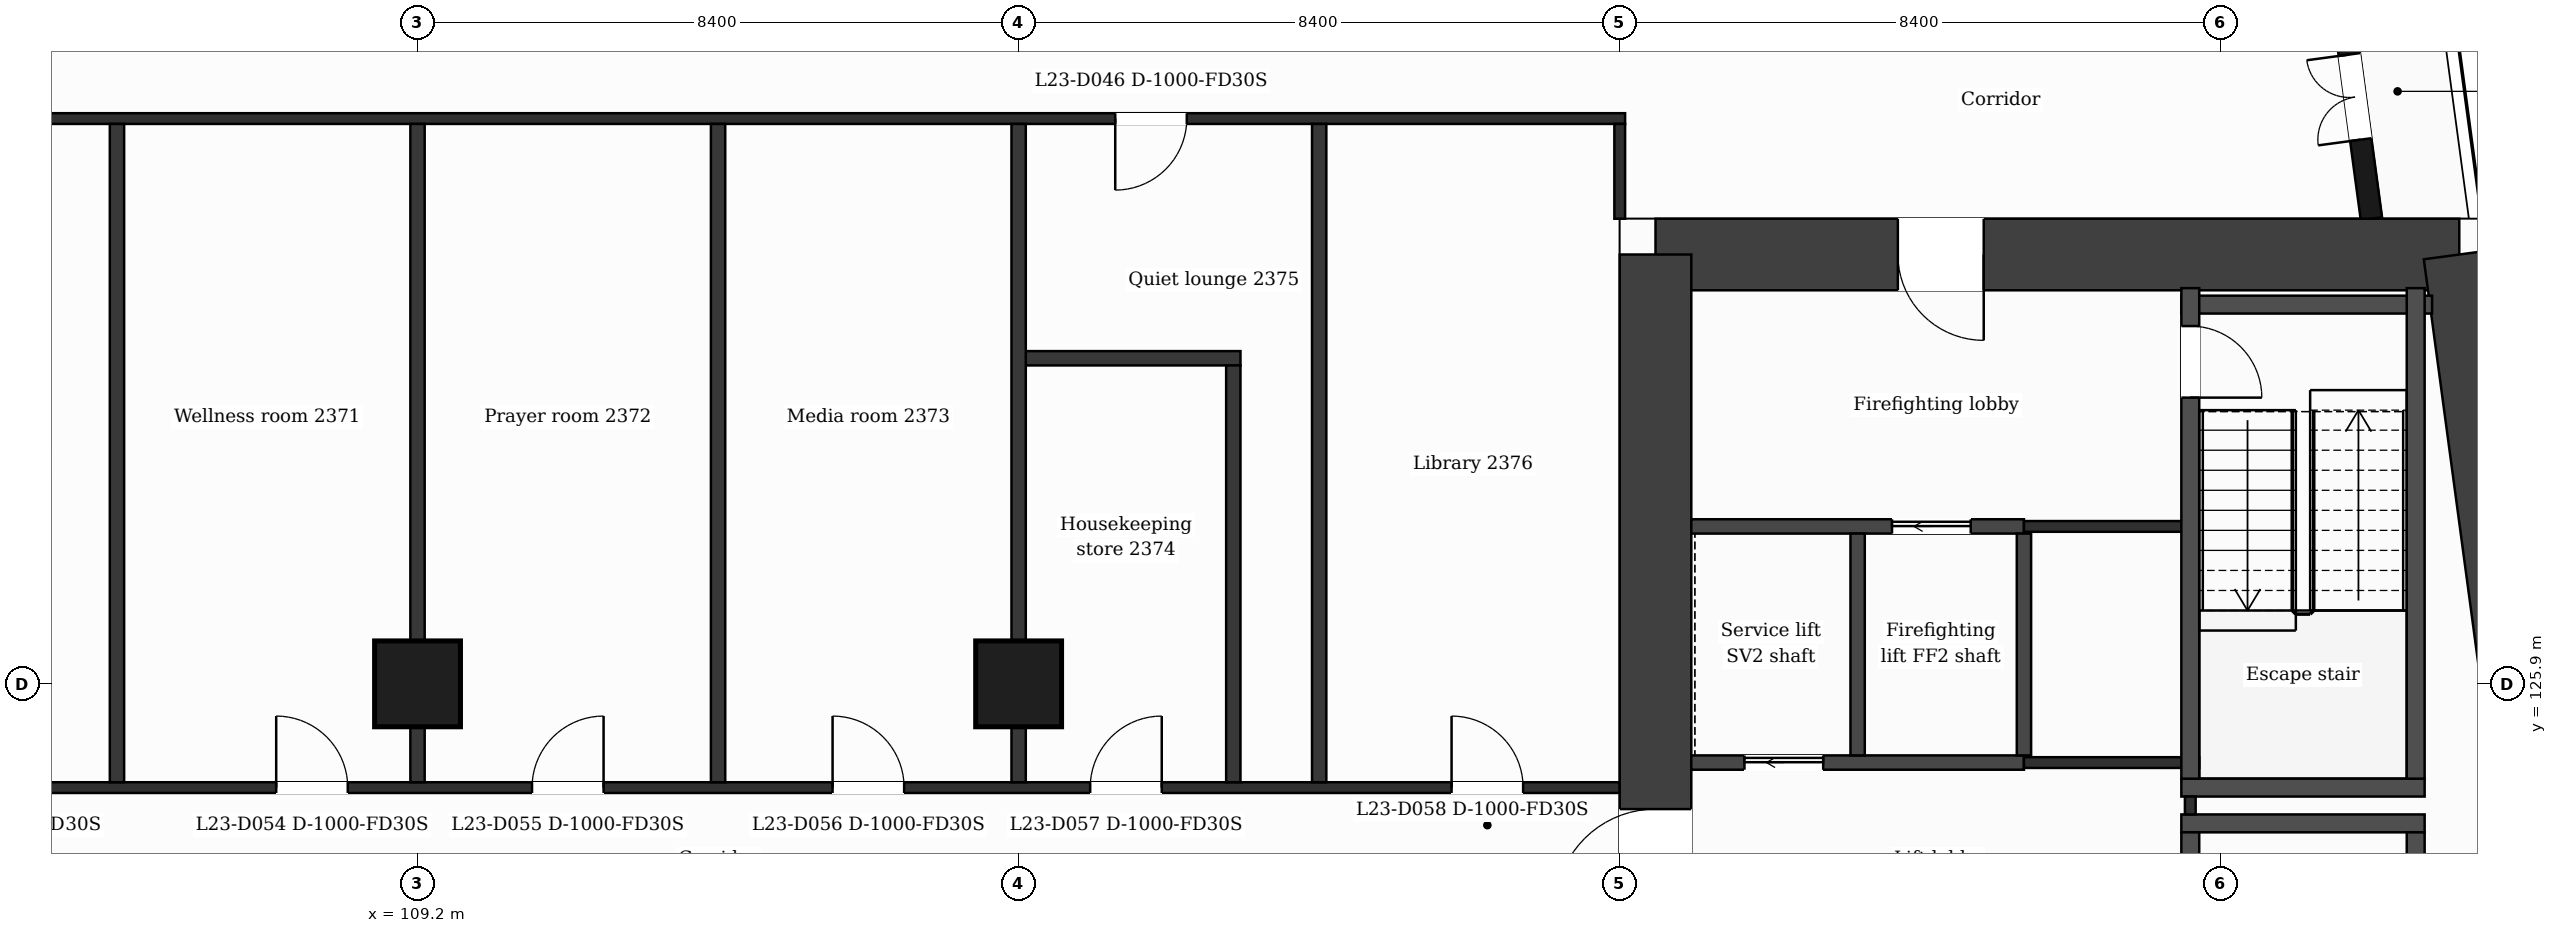
"""IFC4 building model, lengths in metres.
Left out: names, types, materials, properties, quantities, classifications, styles, units other than length and angle.
Written with IfcOpenShell. Run it as: python <this file> out.ifc"""

import sys

from ifc_helpers import new_model, si_unit, direction, frame, frame_2d, origin, origin_2d, place, context, subcontext, project, spatial, rectangle, extrude, element, fill, save


model = new_model("IFC4")
c1 = context("Model", 3, precision=1e-05, world=origin(), true_north=direction((0.0, 1.0)))
c2 = subcontext(c1, "Body", "Model", "MODEL_VIEW")
j1 = project(units=[si_unit("LENGTHUNIT", "METRE"), si_unit("PLANEANGLEUNIT", "RADIAN")], contexts=[c1])
p1 = place(None, origin())
s1 = spatial("IfcSite", under=j1, at=p1, CompositionType="ELEMENT")
p2 = place(p1, origin())
s2 = spatial("IfcBuilding", under=s1, at=p2, CompositionType="ELEMENT")
p3 = place(p2, frame((0.0, 0.0, 102.1)))
s3 = spatial("IfcBuildingStorey", under=s2, at=p3, CompositionType="ELEMENT", Elevation=102.1)
p4 = place(p3, frame((126.5, 131.9, 0.0), z_axis=(0.0, 0.0, 1.0), x_axis=(1.0, 0.0, 0.0)))
e1 = element("IfcWall", 1, at=p4, inside=s3, PredefinedType="SHEAR", context=c2, shape_type="SweptSolid", body=[
    extrude(rectangle(XDim=11.232, YDim=1.0, at=frame_2d((5.616, 0.0))), origin(), (0.0, 0.0, 1.0), 3.7),
])
p5 = place(p4, frame((3.386, 0.0, 0.0)))
e2 = element("IfcOpeningElement", 2, at=p5, cuts=e1, PredefinedType="OPENING", context=c2, shape_type="SweptSolid", body=[
    extrude(rectangle(XDim=1.2, YDim=2.1, at=frame_2d((0.6, 1.05))), frame((0.0, 0.51, 0.0), z_axis=(0.0, -1.0, 0.0), x_axis=(1.0, 0.0, 0.0)), (0.0, 0.0, 1.0), 1.02),
])
p6 = place(p3, frame((137.732, 131.9, 0.0), z_axis=(0.0, 0.0, 1.0), x_axis=(0.133411141623, -0.991060778808, 0.0)))
e3 = element("IfcWall", 3, at=p6, inside=s3, PredefinedType="SHEAR", context=c2, shape_type="SweptSolid", body=[
    extrude(rectangle(XDim=21.189, YDim=1.0, at=frame_2d((10.595, 0.0))), origin(), (0.0, 0.0, 1.0), 3.7),
])
p7 = place(p3, frame((126.5, 110.9, 0.0), z_axis=(0.0, 0.0, 1.0), x_axis=(0.0, 1.0, 0.0)))
e4 = element("IfcWall", 4, at=p7, inside=s3, PredefinedType="SHEAR", context=c2, shape_type="SweptSolid", body=[
    extrude(rectangle(XDim=21.0, YDim=1.0, at=frame_2d((10.5, 0.0))), origin(), (0.0, 0.0, 1.0), 3.7),
])
p8 = place(p7, frame((11.85, 0.0, 0.0)))
e5 = element("IfcOpeningElement", 5, at=p8, cuts=e4, PredefinedType="OPENING", context=c2, shape_type="SweptSolid", body=[
    extrude(rectangle(XDim=1.4, YDim=2.1, at=frame_2d((0.7, 1.05))), frame((0.0, 0.51, 0.0), z_axis=(0.0, -1.0, 0.0), x_axis=(1.0, 0.0, 0.0)), (0.0, 0.0, 1.0), 1.02),
])
for number, where, z_axis, x_axis in (
    (6, (109.2, 125.9, 0.0), (0.0, 0.0, 1.0), (1.0, 0.0, 0.0)),
    (7, (117.6, 125.9, 0.0), (0.0, 0.0, 1.0), (1.0, 0.0, 0.0)),
):
    element("IfcColumn", number, at=place(p3, frame(where, z_axis=z_axis, x_axis=x_axis)), inside=s3, PredefinedType="COLUMN", context=c2, shape_type="SweptSolid", body=[
        extrude(rectangle(XDim=1.2, YDim=1.2, at=origin_2d()), origin(), (0.0, 0.0, 1.0), 3.7),
    ])
p9 = place(p3, frame((136.504, 132.4, 0.0), z_axis=(0.0, 0.0, 1.0), x_axis=(-0.133399697462, 0.99106231929, 0.0)))
e8 = element("IfcWall", 8, at=p9, inside=s3, PredefinedType="SOLIDWALL", context=c2, shape_type="SweptSolid", body=[
    extrude(rectangle(XDim=6.74, YDim=0.3, at=frame_2d((3.37, 0.0))), origin(), (0.0, 0.0, 1.0), 3.38),
])
p10 = place(p9, frame((1.115, 0.0, 0.0)))
e9 = element("IfcOpeningElement", 9, at=p10, cuts=e8, PredefinedType="OPENING", context=c2, shape_type="SweptSolid", body=[
    extrude(rectangle(XDim=1.2, YDim=2.4, at=frame_2d((0.6, 1.2))), frame((0.0, 0.16, 0.0), z_axis=(0.0, -1.0, 0.0), x_axis=(1.0, 0.0, 0.0)), (0.0, 0.0, 1.0), 0.32),
])
p11 = place(p9, frame((3.835, 0.0, 0.9)))
e10 = element("IfcOpeningElement", 10, at=p11, cuts=e8, PredefinedType="OPENING", context=c2, shape_type="SweptSolid", body=[
    extrude(rectangle(XDim=2.4, YDim=2.1, at=frame_2d((1.2, 1.05))), frame((0.0, 0.16, 0.0), z_axis=(0.0, -1.0, 0.0), x_axis=(1.0, 0.0, 0.0)), (0.0, 0.0, 1.0), 0.32),
])
for number, where, z_axis, x_axis in (
    (11, (133.848, 123.95, 0.0), (0.0, 0.0, 1.0), (1.0, 0.0, 0.0)),
    (12, (133.848, 124.45, 0.0), (0.0, 0.0, 1.0), (1.0, 0.0, 0.0)),
):
    element("IfcWall", number, at=place(p3, frame(where, z_axis=z_axis, x_axis=x_axis)), inside=s3, PredefinedType="PARTITIONING", context=c2, shape_type="SweptSolid", body=[
        extrude(rectangle(XDim=3.4, YDim=0.25, at=frame_2d((1.7, 0.0))), origin(), (0.0, 0.0, 1.0), 3.38),
    ])
p12 = place(p3, frame((100.8, 124.45, 0.0), z_axis=(0.0, 0.0, 1.0), x_axis=(1.0, 0.0, 0.0)))
e13 = element("IfcWall", 13, at=p12, inside=s3, PredefinedType="PARTITIONING", context=c2, shape_type="SweptSolid", body=[
    extrude(rectangle(XDim=25.2, YDim=0.15, at=frame_2d((12.6, 0.0))), origin(), (0.0, 0.0, 1.0), 3.38),
])
p13 = place(p12, frame((1.85, 0.0, 0.0)))
e14 = element("IfcOpeningElement", 14, at=p13, cuts=e13, PredefinedType="OPENING", context=c2, shape_type="SweptSolid", body=[
    extrude(rectangle(XDim=1.0, YDim=2.1, at=frame_2d((0.5, 1.05))), frame((0.0, 0.085, 0.0), z_axis=(0.0, -1.0, 0.0), x_axis=(1.0, 0.0, 0.0)), (0.0, 0.0, 1.0), 0.17),
])
p14 = place(p12, frame((6.425, 0.0, 0.0)))
e15 = element("IfcOpeningElement", 15, at=p14, cuts=e13, PredefinedType="OPENING", context=c2, shape_type="SweptSolid", body=[
    extrude(rectangle(XDim=1.0, YDim=2.1, at=frame_2d((0.5, 1.05))), frame((0.0, 0.085, 0.0), z_axis=(0.0, -1.0, 0.0), x_axis=(1.0, 0.0, 0.0)), (0.0, 0.0, 1.0), 0.17),
])
p15 = place(p12, frame((10.0, 0.0, 0.0)))
e16 = element("IfcOpeningElement", 16, at=p15, cuts=e13, PredefinedType="OPENING", context=c2, shape_type="SweptSolid", body=[
    extrude(rectangle(XDim=1.0, YDim=2.1, at=frame_2d((0.5, 1.05))), frame((0.0, 0.085, 0.0), z_axis=(0.0, -1.0, 0.0), x_axis=(1.0, 0.0, 0.0)), (0.0, 0.0, 1.0), 0.17),
])
p16 = place(p12, frame((14.2, 0.0, 0.0)))
e17 = element("IfcOpeningElement", 17, at=p16, cuts=e13, PredefinedType="OPENING", context=c2, shape_type="SweptSolid", body=[
    extrude(rectangle(XDim=1.0, YDim=2.1, at=frame_2d((0.5, 1.05))), frame((0.0, 0.085, 0.0), z_axis=(0.0, -1.0, 0.0), x_axis=(1.0, 0.0, 0.0)), (0.0, 0.0, 1.0), 0.17),
])
p17 = place(p12, frame((17.8, 0.0, 0.0)))
e18 = element("IfcOpeningElement", 18, at=p17, cuts=e13, PredefinedType="OPENING", context=c2, shape_type="SweptSolid", body=[
    extrude(rectangle(XDim=1.0, YDim=2.1, at=frame_2d((0.5, 1.05))), frame((0.0, 0.085, 0.0), z_axis=(0.0, -1.0, 0.0), x_axis=(1.0, 0.0, 0.0)), (0.0, 0.0, 1.0), 0.17),
])
p18 = place(p12, frame((22.85, 0.0, 0.0)))
e19 = element("IfcOpeningElement", 19, at=p18, cuts=e13, PredefinedType="OPENING", context=c2, shape_type="SweptSolid", body=[
    extrude(rectangle(XDim=1.0, YDim=2.1, at=frame_2d((0.5, 1.05))), frame((0.0, 0.085, 0.0), z_axis=(0.0, -1.0, 0.0), x_axis=(1.0, 0.0, 0.0)), (0.0, 0.0, 1.0), 0.17),
])
p19 = place(p3, frame((127.0, 124.8, 0.0), z_axis=(0.0, 0.0, 1.0), x_axis=(1.0, 0.0, 0.0)))
e20 = element("IfcWall", 20, at=p19, inside=s3, PredefinedType="PARTITIONING", context=c2, shape_type="SweptSolid", body=[
    extrude(rectangle(XDim=4.649, YDim=0.2, at=frame_2d((2.324, 0.0))), origin(), (0.0, 0.0, 1.0), 3.38),
])
p20 = place(p19, frame((0.743, 0.0, 0.0)))
e21 = element("IfcOpeningElement", 21, at=p20, cuts=e20, PredefinedType="OPENING", context=c2, shape_type="SweptSolid", body=[
    extrude(rectangle(XDim=1.1, YDim=2.1, at=frame_2d((0.55, 1.05))), frame((0.0, 0.11, 0.0), z_axis=(0.0, -1.0, 0.0), x_axis=(1.0, 0.0, 0.0)), (0.0, 0.0, 1.0), 0.22),
])
p21 = place(p3, frame((131.649, 124.8, 0.0), z_axis=(0.0, 0.0, 1.0), x_axis=(1.0, 0.0, 0.0)))
e22 = element("IfcWall", 22, at=p21, inside=s3, PredefinedType="PARTITIONING", context=c2, shape_type="SweptSolid", body=[
    extrude(rectangle(XDim=2.449, YDim=0.15, at=frame_2d((1.225, 0.0))), origin(), (0.0, 0.0, 1.0), 3.38),
])
p22 = place(p3, frame((127.0, 128.1, 0.0), z_axis=(0.0, 0.0, 1.0), x_axis=(1.0, 0.0, 0.0)))
e23 = element("IfcWall", 23, at=p22, inside=s3, PredefinedType="PARTITIONING", context=c2, shape_type="SweptSolid", body=[
    extrude(rectangle(XDim=4.649, YDim=0.2, at=frame_2d((2.324, 0.0))), origin(), (0.0, 0.0, 1.0), 3.38),
])
p23 = place(p22, frame((2.805, 0.0, 0.0)))
e24 = element("IfcOpeningElement", 24, at=p23, cuts=e23, PredefinedType="OPENING", context=c2, shape_type="SweptSolid", body=[
    extrude(rectangle(XDim=1.1, YDim=2.1, at=frame_2d((0.55, 1.05))), frame((0.0, 0.11, 0.0), z_axis=(0.0, -1.0, 0.0), x_axis=(1.0, 0.0, 0.0)), (0.0, 0.0, 1.0), 0.22),
])
p24 = place(p3, frame((131.649, 128.1, 0.0), z_axis=(0.0, 0.0, 1.0), x_axis=(1.0, 0.0, 0.0)))
e25 = element("IfcWall", 25, at=p24, inside=s3, PredefinedType="PARTITIONING", context=c2, shape_type="SweptSolid", body=[
    extrude(rectangle(XDim=2.324, YDim=0.15, at=frame_2d((1.162, 0.0))), origin(), (0.0, 0.0, 1.0), 3.38),
])
p25 = place(p3, frame((117.6, 130.45, 0.0), z_axis=(0.0, 0.0, 1.0), x_axis=(1.0, 0.0, 0.0)))
e26 = element("IfcWall", 26, at=p25, inside=s3, PredefinedType="PARTITIONING", context=c2, shape_type="SweptSolid", body=[
    extrude(rectangle(XDim=3.1, YDim=0.2, at=frame_2d((1.55, 0.0))), origin(), (0.0, 0.0, 1.0), 3.38),
])
p26 = place(p3, frame((133.848, 131.2, 0.0), z_axis=(0.0, 0.0, 1.0), x_axis=(1.0, 0.0, 0.0)))
e27 = element("IfcWall", 27, at=p26, inside=s3, PredefinedType="PARTITIONING", context=c2, shape_type="SweptSolid", body=[
    extrude(rectangle(XDim=3.504, YDim=0.25, at=frame_2d((1.752, 0.0))), origin(), (0.0, 0.0, 1.0), 3.38),
])
p27 = place(p3, frame((100.725, 133.8, 0.0), z_axis=(0.0, 0.0, 1.0), x_axis=(1.0, 0.0, 0.0)))
e28 = element("IfcWall", 28, at=p27, inside=s3, PredefinedType="PARTITIONING", context=c2, shape_type="SweptSolid", body=[
    extrude(rectangle(XDim=25.35, YDim=0.15, at=frame_2d((12.675, 0.0))), origin(), (0.0, 0.0, 1.0), 3.38),
])
p28 = place(p27, frame((18.225, 0.0, 0.0)))
e29 = element("IfcOpeningElement", 29, at=p28, cuts=e28, PredefinedType="OPENING", context=c2, shape_type="SweptSolid", body=[
    extrude(rectangle(XDim=1.0, YDim=2.1, at=frame_2d((0.5, 1.05))), frame((0.0, 0.085, 0.0), z_axis=(0.0, -1.0, 0.0), x_axis=(1.0, 0.0, 0.0)), (0.0, 0.0, 1.0), 0.17),
])
for number, where, z_axis, x_axis in (
    (30, (105.0, 124.525, 0.0), (0.0, 0.0, 1.0), (0.0, 1.0, 0.0)),
    (31, (109.2, 124.525, 0.0), (0.0, 0.0, 1.0), (0.0, 1.0, 0.0)),
    (32, (113.4, 124.525, 0.0), (0.0, 0.0, 1.0), (0.0, 1.0, 0.0)),
    (33, (117.6, 124.525, 0.0), (0.0, 0.0, 1.0), (0.0, 1.0, 0.0)),
):
    element("IfcWall", number, at=place(p3, frame(where, z_axis=z_axis, x_axis=x_axis)), inside=s3, PredefinedType="PARTITIONING", context=c2, shape_type="SweptSolid", body=[
        extrude(rectangle(XDim=9.2, YDim=0.2, at=frame_2d((4.6, 0.0))), origin(), (0.0, 0.0, 1.0), 3.38),
    ])
p29 = place(p3, frame((120.6, 124.525, 0.0), z_axis=(0.0, 0.0, 1.0), x_axis=(0.0, 1.0, 0.0)))
e34 = element("IfcWall", 34, at=p29, inside=s3, PredefinedType="PARTITIONING", context=c2, shape_type="SweptSolid", body=[
    extrude(rectangle(XDim=5.825, YDim=0.2, at=frame_2d((2.913, 0.0))), origin(), (0.0, 0.0, 1.0), 3.38),
])
p30 = place(p3, frame((121.8, 124.525, 0.0), z_axis=(0.0, 0.0, 1.0), x_axis=(0.0, 1.0, 0.0)))
e35 = element("IfcWall", 35, at=p30, inside=s3, PredefinedType="PARTITIONING", context=c2, shape_type="SweptSolid", body=[
    extrude(rectangle(XDim=9.2, YDim=0.2, at=frame_2d((4.6, 0.0))), origin(), (0.0, 0.0, 1.0), 3.38),
])
p31 = place(p3, frame((126.0, 132.4, 0.0), z_axis=(0.0, 0.0, 1.0), x_axis=(0.0, 1.0, 0.0)))
e36 = element("IfcWall", 36, at=p31, inside=s3, PredefinedType="PARTITIONING", context=c2, shape_type="SweptSolid", body=[
    extrude(rectangle(XDim=1.325, YDim=0.15, at=frame_2d((0.663, 0.0))), origin(), (0.0, 0.0, 1.0), 3.38),
])
for number, where, z_axis, x_axis in (
    (37, (129.324, 124.9, 0.0), (0.0, 0.0, 1.0), (0.0, 1.0, 0.0)),
    (38, (131.649, 124.9, 0.0), (0.0, 0.0, 1.0), (0.0, 1.0, 0.0)),
):
    element("IfcWall", number, at=place(p3, frame(where, z_axis=z_axis, x_axis=x_axis)), inside=s3, PredefinedType="PARTITIONING", context=c2, shape_type="SweptSolid", body=[
        extrude(rectangle(XDim=3.1, YDim=0.2, at=frame_2d((1.55, 0.0))), origin(), (0.0, 0.0, 1.0), 3.38),
    ])
p32 = place(p3, frame((133.973, 124.075, 0.0), z_axis=(0.0, 0.0, 1.0), x_axis=(0.0, 1.0, 0.0)))
e39 = element("IfcWall", 39, at=p32, inside=s3, PredefinedType="PARTITIONING", context=c2, shape_type="SweptSolid", body=[
    extrude(rectangle(XDim=0.25, YDim=0.15, at=frame_2d((0.125, 0.0))), origin(), (0.0, 0.0, 1.0), 3.38),
])
p33 = place(p3, frame((133.973, 116.97, 0.0), z_axis=(0.0, 0.0, 1.0), x_axis=(0.0, 1.0, 0.0)))
e40 = element("IfcWall", 40, at=p33, inside=s3, PredefinedType="PARTITIONING", context=c2, shape_type="SweptSolid", body=[
    extrude(rectangle(XDim=6.855, YDim=0.25, at=frame_2d((3.427, 0.0))), origin(), (0.0, 0.0, 1.0), 3.38),
])
p34 = place(p33, frame((5.555, 0.0, 0.0)))
e41 = element("IfcOpeningElement", 41, at=p34, cuts=e40, PredefinedType="OPENING", context=c2, shape_type="SweptSolid", body=[
    extrude(rectangle(XDim=0.95, YDim=2.1, at=frame_2d((0.475, 1.05))), frame((0.0, 0.135, 0.0), z_axis=(0.0, -1.0, 0.0), x_axis=(1.0, 0.0, 0.0)), (0.0, 0.0, 1.0), 0.27),
])
p35 = place(p3, frame((133.973, 124.575, 0.0), z_axis=(0.0, 0.0, 1.0), x_axis=(0.0, 1.0, 0.0)))
e42 = element("IfcWall", 42, at=p35, inside=s3, PredefinedType="PARTITIONING", context=c2, shape_type="SweptSolid", body=[
    extrude(rectangle(XDim=6.855, YDim=0.25, at=frame_2d((3.427, 0.0))), origin(), (0.0, 0.0, 1.0), 3.38),
])
p36 = place(p35, frame((5.325, 0.0, 0.0)))
e43 = element("IfcOpeningElement", 43, at=p36, cuts=e42, PredefinedType="OPENING", context=c2, shape_type="SweptSolid", body=[
    extrude(rectangle(XDim=1.0, YDim=2.1, at=frame_2d((0.5, 1.05))), frame((0.0, 0.135, 0.0), z_axis=(0.0, -1.0, 0.0), x_axis=(1.0, 0.0, 0.0)), (0.0, 0.0, 1.0), 0.27),
])
for number, where, z_axis, x_axis in (
    (44, (137.123, 116.97, 0.0), (0.0, 0.0, 1.0), (0.0, 1.0, 0.0)),
    (45, (137.123, 124.575, 0.0), (0.0, 0.0, 1.0), (0.0, 1.0, 0.0)),
):
    element("IfcWall", number, at=place(p3, frame(where, z_axis=z_axis, x_axis=x_axis)), inside=s3, PredefinedType="PARTITIONING", context=c2, shape_type="SweptSolid", body=[
        extrude(rectangle(XDim=6.855, YDim=0.25, at=frame_2d((3.427, 0.0))), origin(), (0.0, 0.0, 1.0), 3.38),
    ])
p37 = place(p10, origin())
e46 = element("IfcDoor", 46, at=p37, inside=s3, OperationType="DOUBLE_DOOR_SINGLE_SWING", PredefinedType="DOOR", context=c2, shape_type="SweptSolid", body=[
    extrude(rectangle(XDim=1.2, YDim=2.4, at=frame_2d((0.6, 1.2))), frame((0.0, 0.025, 0.0), z_axis=(0.0, -1.0, 0.0), x_axis=(1.0, 0.0, 0.0)), (0.0, 0.0, 1.0), 0.05),
])
fill(e9, e46)
p38 = place(p23, origin())
e47 = element("IfcDoor", 47, at=p38, inside=s3, OperationType="SLIDING_TO_LEFT", PredefinedType="DOOR", context=c2, shape_type="SweptSolid", body=[
    extrude(rectangle(XDim=1.1, YDim=2.1, at=frame_2d((0.55, 1.05))), frame((0.0, 0.025, 0.0), z_axis=(0.0, -1.0, 0.0), x_axis=(1.0, 0.0, 0.0)), (0.0, 0.0, 1.0), 0.05),
])
fill(e24, e47)
p39 = place(p20, origin())
e48 = element("IfcDoor", 48, at=p39, inside=s3, OperationType="SLIDING_TO_LEFT", PredefinedType="DOOR", context=c2, shape_type="SweptSolid", body=[
    extrude(rectangle(XDim=1.1, YDim=2.1, at=frame_2d((0.55, 1.05))), frame((0.0, 0.025, 0.0), z_axis=(0.0, -1.0, 0.0), x_axis=(1.0, 0.0, 0.0)), (0.0, 0.0, 1.0), 0.05),
])
fill(e21, e48)
p40 = place(p36, origin())
e49 = element("IfcDoor", 49, at=p40, inside=s3, OperationType="SINGLE_SWING_LEFT", PredefinedType="DOOR", context=c2, shape_type="SweptSolid", body=[
    extrude(rectangle(XDim=1.0, YDim=2.1, at=frame_2d((0.5, 1.05))), frame((0.0, 0.025, 0.0), z_axis=(0.0, -1.0, 0.0), x_axis=(1.0, 0.0, 0.0)), (0.0, 0.0, 1.0), 0.05),
])
fill(e43, e49)
p41 = place(p28, origin())
e50 = element("IfcDoor", 50, at=p41, inside=s3, OperationType="SINGLE_SWING_LEFT", PredefinedType="DOOR", context=c2, shape_type="SweptSolid", body=[
    extrude(rectangle(XDim=1.0, YDim=2.1, at=frame_2d((0.5, 1.05))), frame((0.0, 0.025, 0.0), z_axis=(0.0, -1.0, 0.0), x_axis=(1.0, 0.0, 0.0)), (0.0, 0.0, 1.0), 0.05),
])
fill(e29, e50)
p42 = place(p14, origin())
e51 = element("IfcDoor", 51, at=p42, inside=s3, OperationType="SINGLE_SWING_LEFT", PredefinedType="DOOR", context=c2, shape_type="SweptSolid", body=[
    extrude(rectangle(XDim=1.0, YDim=2.1, at=frame_2d((0.5, 1.05))), frame((0.0, 0.025, 0.0), z_axis=(0.0, -1.0, 0.0), x_axis=(1.0, 0.0, 0.0)), (0.0, 0.0, 1.0), 0.05),
])
fill(e15, e51)
p43 = place(p15, origin())
e52 = element("IfcDoor", 52, at=p43, inside=s3, OperationType="SINGLE_SWING_RIGHT", PredefinedType="DOOR", context=c2, shape_type="SweptSolid", body=[
    extrude(rectangle(XDim=1.0, YDim=2.1, at=frame_2d((0.5, 1.05))), frame((0.0, 0.025, 0.0), z_axis=(0.0, -1.0, 0.0), x_axis=(1.0, 0.0, 0.0)), (0.0, 0.0, 1.0), 0.05),
])
fill(e16, e52)
p44 = place(p16, origin())
e53 = element("IfcDoor", 53, at=p44, inside=s3, OperationType="SINGLE_SWING_LEFT", PredefinedType="DOOR", context=c2, shape_type="SweptSolid", body=[
    extrude(rectangle(XDim=1.0, YDim=2.1, at=frame_2d((0.5, 1.05))), frame((0.0, 0.025, 0.0), z_axis=(0.0, -1.0, 0.0), x_axis=(1.0, 0.0, 0.0)), (0.0, 0.0, 1.0), 0.05),
])
fill(e17, e53)
p45 = place(p17, origin())
e54 = element("IfcDoor", 54, at=p45, inside=s3, OperationType="SINGLE_SWING_RIGHT", PredefinedType="DOOR", context=c2, shape_type="SweptSolid", body=[
    extrude(rectangle(XDim=1.0, YDim=2.1, at=frame_2d((0.5, 1.05))), frame((0.0, 0.025, 0.0), z_axis=(0.0, -1.0, 0.0), x_axis=(1.0, 0.0, 0.0)), (0.0, 0.0, 1.0), 0.05),
])
fill(e18, e54)
p46 = place(p18, origin())
e55 = element("IfcDoor", 55, at=p46, inside=s3, OperationType="SINGLE_SWING_LEFT", PredefinedType="DOOR", context=c2, shape_type="SweptSolid", body=[
    extrude(rectangle(XDim=1.0, YDim=2.1, at=frame_2d((0.5, 1.05))), frame((0.0, 0.025, 0.0), z_axis=(0.0, -1.0, 0.0), x_axis=(1.0, 0.0, 0.0)), (0.0, 0.0, 1.0), 0.05),
])
fill(e19, e55)
p47 = place(p5, origin())
e56 = element("IfcDoor", 56, at=p47, inside=s3, OperationType="SINGLE_SWING_RIGHT", PredefinedType="DOOR", context=c2, shape_type="SweptSolid", body=[
    extrude(rectangle(XDim=1.2, YDim=2.1, at=frame_2d((0.6, 1.05))), frame((0.0, 0.025, 0.0), z_axis=(0.0, -1.0, 0.0), x_axis=(1.0, 0.0, 0.0)), (0.0, 0.0, 1.0), 0.05),
])
fill(e2, e56)
p48 = place(p8, origin())
e57 = element("IfcDoor", 57, at=p48, inside=s3, OperationType="SINGLE_SWING_LEFT", PredefinedType="DOOR", context=c2, shape_type="SweptSolid", body=[
    extrude(rectangle(XDim=1.4, YDim=2.1, at=frame_2d((0.7, 1.05))), frame((0.0, 0.025, 0.0), z_axis=(0.0, -1.0, 0.0), x_axis=(1.0, 0.0, 0.0)), (0.0, 0.0, 1.0), 0.05),
])
fill(e5, e57)
save(model, sys.argv[1])
